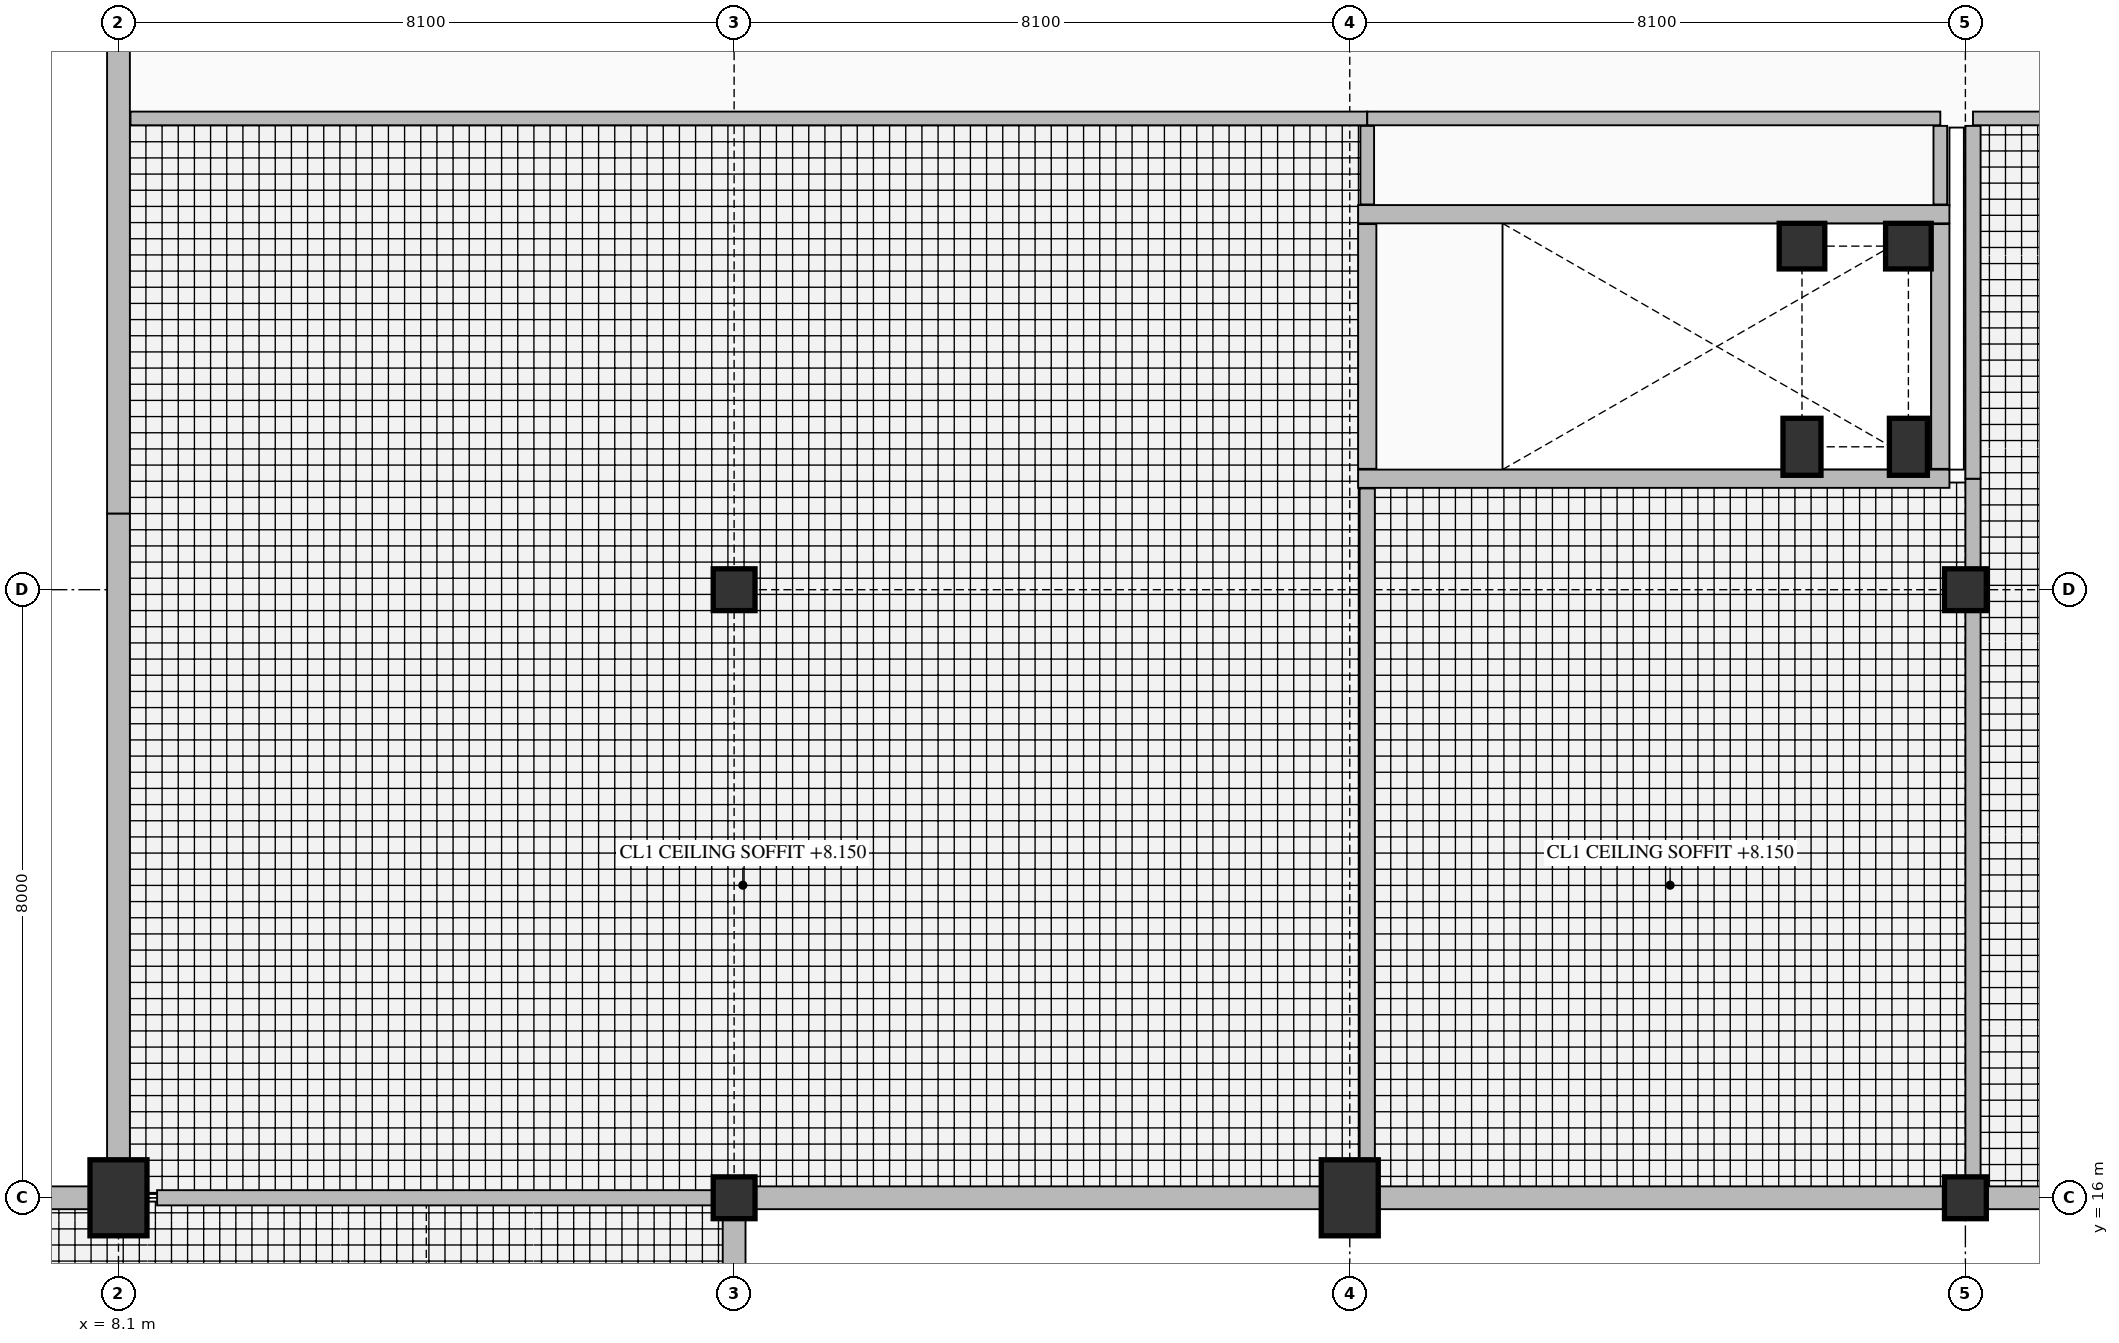
"""IFC4 building model, lengths in metres.
Left out: names, types, materials, properties, quantities, classifications, styles, units other than length and angle.
Written with IfcOpenShell. Run it as: python <this file> out.ifc"""

import sys

from ifc_helpers import new_model, si_unit, direction, frame, frame_2d, origin, origin_2d, place, context, subcontext, project, spatial, rectangle, extrude, element, fill, save


model = new_model("IFC4")
c1 = context("Model", 3, precision=1e-05, world=origin(), true_north=direction((0.0, 1.0)))
c2 = subcontext(c1, "Body", "Model", "MODEL_VIEW")
j1 = project(units=[si_unit("LENGTHUNIT", "METRE"), si_unit("PLANEANGLEUNIT", "RADIAN")], contexts=[c1])
p1 = place(None, origin())
s1 = spatial("IfcSite", under=j1, at=p1, CompositionType="ELEMENT")
p2 = place(p1, origin())
s2 = spatial("IfcBuilding", under=s1, at=p2, CompositionType="ELEMENT")
p3 = place(p2, frame((0.0, 0.0, 5.4)))
s3 = spatial("IfcBuildingStorey", under=s2, at=p3, CompositionType="ELEMENT", Elevation=5.4)
p4 = place(p3, frame((8.1, 16.0, 0.0), z_axis=(0.0, 0.0, 1.0), x_axis=(1.0, 0.0, 0.0)))
e1 = element("IfcColumn", 1, at=p4, inside=s3, PredefinedType="COLUMN", context=c2, shape_type="SweptSolid", body=[
    extrude(rectangle(XDim=0.75, YDim=1.0, at=origin_2d()), origin(), (0.0, 0.0, 1.0), 4.8),
])
for number, where, z_axis, x_axis in (
    (2, (16.2, 16.0, 0.0), (0.0, 0.0, 1.0), (1.0, 0.0, 0.0)),
    (3, (16.2, 24.0, 0.0), (0.0, 0.0, 1.0), (1.0, 0.0, 0.0)),
):
    element("IfcColumn", number, at=place(p3, frame(where, z_axis=z_axis, x_axis=x_axis)), inside=s3, PredefinedType="COLUMN", context=c2, shape_type="SweptSolid", body=[
        extrude(rectangle(XDim=0.55, YDim=0.55, at=origin_2d()), origin(), (0.0, 0.0, 1.0), 4.8),
    ])
p5 = place(p3, frame((24.3, 16.0, 0.0), z_axis=(0.0, 0.0, 1.0), x_axis=(1.0, 0.0, 0.0)))
e4 = element("IfcColumn", 4, at=p5, inside=s3, PredefinedType="COLUMN", context=c2, shape_type="SweptSolid", body=[
    extrude(rectangle(XDim=0.75, YDim=1.0, at=origin_2d()), origin(), (0.0, 0.0, 1.0), 4.8),
])
p6 = place(p3, frame((30.25, 25.88, 0.0), z_axis=(0.0, 0.0, 1.0), x_axis=(1.0, 0.0, 0.0)))
e5 = element("IfcColumn", 5, at=p6, inside=s3, PredefinedType="COLUMN", context=c2, shape_type="SweptSolid", body=[
    extrude(rectangle(XDim=0.5, YDim=0.75, at=origin_2d()), origin(), (0.0, 0.0, 1.0), 4.8),
])
p7 = place(p3, frame((30.25, 28.52, 0.0), z_axis=(0.0, 0.0, 1.0), x_axis=(1.0, 0.0, 0.0)))
e6 = element("IfcColumn", 6, at=p7, inside=s3, PredefinedType="COLUMN", context=c2, shape_type="SweptSolid", body=[
    extrude(rectangle(XDim=0.6, YDim=0.6, at=origin_2d()), origin(), (0.0, 0.0, 1.0), 4.8),
])
p8 = place(p3, frame((31.65, 25.88, 0.0), z_axis=(0.0, 0.0, 1.0), x_axis=(1.0, 0.0, 0.0)))
e7 = element("IfcColumn", 7, at=p8, inside=s3, PredefinedType="COLUMN", context=c2, shape_type="SweptSolid", body=[
    extrude(rectangle(XDim=0.5, YDim=0.75, at=origin_2d()), origin(), (0.0, 0.0, 1.0), 4.8),
])
p9 = place(p3, frame((31.65, 28.52, 0.0), z_axis=(0.0, 0.0, 1.0), x_axis=(1.0, 0.0, 0.0)))
e8 = element("IfcColumn", 8, at=p9, inside=s3, PredefinedType="COLUMN", context=c2, shape_type="SweptSolid", body=[
    extrude(rectangle(XDim=0.6, YDim=0.6, at=origin_2d()), origin(), (0.0, 0.0, 1.0), 4.8),
])
for number, where, z_axis, x_axis in (
    (9, (32.4, 16.0, 0.0), (0.0, 0.0, 1.0), (1.0, 0.0, 0.0)),
    (10, (32.4, 24.0, 0.0), (0.0, 0.0, 1.0), (1.0, 0.0, 0.0)),
):
    element("IfcColumn", number, at=place(p3, frame(where, z_axis=z_axis, x_axis=x_axis)), inside=s3, PredefinedType="COLUMN", context=c2, shape_type="SweptSolid", body=[
        extrude(rectangle(XDim=0.55, YDim=0.55, at=origin_2d()), origin(), (0.0, 0.0, 1.0), 4.8),
    ])
p10 = place(p3, frame((16.2, 0.0, 0.0), z_axis=(0.0, 0.0, 1.0), x_axis=(0.0, 1.0, 0.0)))
e11 = element("IfcWall", 11, at=p10, inside=s3, PredefinedType="SOLIDWALL", context=c2, shape_type="SweptSolid", body=[
    extrude(rectangle(XDim=16.0, YDim=0.3, at=frame_2d((8.0, 0.0))), origin(), (0.0, 0.0, 1.0), 3.912),
])
p11 = place(p3, frame((16.2, 16.0, 0.0), z_axis=(0.0, 0.0, 1.0), x_axis=(1.0, 0.0, 0.0)))
e12 = element("IfcWall", 12, at=p11, inside=s3, PredefinedType="SOLIDWALL", context=c2, shape_type="SweptSolid", body=[
    extrude(rectangle(XDim=16.2, YDim=0.3, at=frame_2d((8.1, 0.0))), origin(), (0.0, 0.0, 1.0), 3.812),
])
p12 = place(p3, frame((32.4, 16.0, 0.0), z_axis=(0.0, 0.0, 1.0), x_axis=(1.0, 0.0, 0.0)))
e13 = element("IfcWall", 13, at=p12, inside=s3, PredefinedType="SOLIDWALL", context=c2, shape_type="SweptSolid", body=[
    extrude(rectangle(XDim=16.2, YDim=0.3, at=frame_2d((8.1, 0.0))), origin(), (0.0, 0.0, 1.0), 3.812),
])
p13 = place(p3, frame((8.1, 34.0, 0.0), z_axis=(0.0, 0.0, 1.0), x_axis=(0.0, -1.0, 0.0)))
e14 = element("IfcWall", 14, at=p13, inside=s3, PredefinedType="SOLIDWALL", context=c2, shape_type="SweptSolid", body=[
    extrude(rectangle(XDim=9.0, YDim=0.3, at=frame_2d((4.5, 0.0))), origin(), (0.0, 0.0, 1.0), 3.312),
])
p14 = place(p13, frame((4.95, 0.0, 0.95)))
e15 = element("IfcOpeningElement", 15, at=p14, cuts=e14, PredefinedType="OPENING", context=c2, shape_type="SweptSolid", body=[
    extrude(rectangle(XDim=1.8, YDim=1.5, at=frame_2d((0.9, 0.75))), frame((0.0, 0.16, 0.0), z_axis=(0.0, -1.0, 0.0), x_axis=(1.0, 0.0, 0.0)), (0.0, 0.0, 1.0), 0.32),
])
p15 = place(p3, frame((8.1, 25.0, 0.0), z_axis=(0.0, 0.0, 1.0), x_axis=(0.0, -1.0, 0.0)))
e16 = element("IfcWall", 16, at=p15, inside=s3, PredefinedType="SOLIDWALL", context=c2, shape_type="SweptSolid", body=[
    extrude(rectangle(XDim=9.0, YDim=0.3, at=frame_2d((4.5, 0.0))), origin(), (0.0, 0.0, 1.0), 3.312),
])
p16 = place(p15, frame((3.6, 0.0, 0.95)))
e17 = element("IfcOpeningElement", 17, at=p16, cuts=e16, PredefinedType="OPENING", context=c2, shape_type="SweptSolid", body=[
    extrude(rectangle(XDim=1.8, YDim=1.8, at=frame_2d((0.9, 0.9))), frame((0.0, 0.16, 0.0), z_axis=(0.0, -1.0, 0.0), x_axis=(1.0, 0.0, 0.0)), (0.0, 0.0, 1.0), 0.32),
])
p17 = place(p3, frame((8.1, 16.0, 0.0), z_axis=(0.0, 0.0, 1.0), x_axis=(-1.0, 0.0, 0.0)))
e18 = element("IfcWall", 18, at=p17, inside=s3, PredefinedType="SOLIDWALL", context=c2, shape_type="SweptSolid", body=[
    extrude(rectangle(XDim=8.1, YDim=0.3, at=frame_2d((4.05, 0.0))), origin(), (0.0, 0.0, 1.0), 3.812),
])
p18 = place(p17, frame((3.15, 0.0, 0.85)))
e19 = element("IfcOpeningElement", 19, at=p18, cuts=e18, PredefinedType="OPENING", context=c2, shape_type="SweptSolid", body=[
    extrude(rectangle(XDim=1.8, YDim=2.1, at=frame_2d((0.9, 1.05))), frame((0.0, 0.16, 0.0), z_axis=(0.0, -1.0, 0.0), x_axis=(1.0, 0.0, 0.0)), (0.0, 0.0, 1.0), 0.32),
])
p19 = place(p3, frame((16.47, 12.48, 1.2), z_axis=(0.0, 0.0, 1.0), x_axis=(0.0, 1.0, 0.0)))
e20 = element("IfcWall", 20, at=p19, inside=s3, PredefinedType="PARAPET", context=c2, shape_type="SweptSolid", body=[
    extrude(rectangle(XDim=3.32, YDim=0.22, at=frame_2d((1.66, 0.0))), origin(), (0.0, 0.0, 1.0), 0.55),
])
p20 = place(p3, frame((24.41, 25.46, 0.0), z_axis=(0.0, 0.0, 1.0), x_axis=(1.0, 0.0, 0.0)))
e21 = element("IfcWall", 21, at=p20, inside=s3, PredefinedType="PARTITIONING", context=c2, shape_type="SweptSolid", body=[
    extrude(rectangle(XDim=7.78, YDim=0.24, at=frame_2d((3.89, 0.0))), origin(), (0.0, 0.0, 1.0), 4.52),
])
p21 = place(p3, frame((24.41, 28.94, 0.0), z_axis=(0.0, 0.0, 1.0), x_axis=(1.0, 0.0, 0.0)))
e22 = element("IfcWall", 22, at=p21, inside=s3, PredefinedType="PARTITIONING", context=c2, shape_type="SweptSolid", body=[
    extrude(rectangle(XDim=7.78, YDim=0.24, at=frame_2d((3.89, 0.0))), origin(), (0.0, 0.0, 1.0), 4.52),
])
p22 = place(p21, frame((0.54, 0.0, 0.0)))
e23 = element("IfcOpeningElement", 23, at=p22, cuts=e22, PredefinedType="OPENING", context=c2, shape_type="SweptSolid", body=[
    extrude(rectangle(XDim=1.1, YDim=2.2, at=frame_2d((0.55, 1.1))), frame((0.0, 0.13, 0.0), z_axis=(0.0, -1.0, 0.0), x_axis=(1.0, 0.0, 0.0)), (0.0, 0.0, 1.0), 0.26),
])
p23 = place(p3, frame((24.53, 25.59, 0.0), z_axis=(0.0, 0.0, 1.0), x_axis=(0.0, 1.0, 0.0)))
e24 = element("IfcWall", 24, at=p23, inside=s3, PredefinedType="PARTITIONING", context=c2, shape_type="SweptSolid", body=[
    extrude(rectangle(XDim=3.22, YDim=0.24, at=frame_2d((1.61, 0.0))), origin(), (0.0, 0.0, 1.0), 3.312),
])
p24 = place(p3, frame((32.07, 25.59, 0.0), z_axis=(0.0, 0.0, 1.0), x_axis=(0.0, 1.0, 0.0)))
e25 = element("IfcWall", 25, at=p24, inside=s3, PredefinedType="PARTITIONING", context=c2, shape_type="SweptSolid", body=[
    extrude(rectangle(XDim=3.22, YDim=0.24, at=frame_2d((1.61, 0.0))), origin(), (0.0, 0.0, 1.0), 3.912),
])
p25 = place(p3, frame((8.608, 16.0, 0.0), z_axis=(0.0, 0.0, 1.0), x_axis=(1.0, 0.0, 0.0)))
e26 = element("IfcWall", 26, at=p25, inside=s3, PredefinedType="PARTITIONING", context=c2, shape_type="SweptSolid", body=[
    extrude(rectangle(XDim=7.309, YDim=0.2, at=frame_2d((3.655, 0.0))), origin(), (0.0, 0.0, 1.0), 3.812),
])
p26 = place(p25, frame((3.155, 0.0, 0.0)))
e27 = element("IfcOpeningElement", 27, at=p26, cuts=e26, PredefinedType="OPENING", context=c2, shape_type="SweptSolid", body=[
    extrude(rectangle(XDim=1.0, YDim=2.2, at=frame_2d((0.5, 1.1))), frame((0.0, 0.11, 0.0), z_axis=(0.0, -1.0, 0.0), x_axis=(1.0, 0.0, 0.0)), (0.0, 0.0, 1.0), 0.22),
])
p27 = place(p3, frame((8.258, 30.2, 0.0), z_axis=(0.0, 0.0, 1.0), x_axis=(1.0, 0.0, 0.0)))
e28 = element("IfcWall", 28, at=p27, inside=s3, PredefinedType="PARTITIONING", context=c2, shape_type="SweptSolid", body=[
    extrude(rectangle(XDim=16.272, YDim=0.18, at=frame_2d((8.136, 0.0))), origin(), (0.0, 0.0, 1.0), 4.52),
])
p28 = place(p27, frame((4.782, 0.0, 0.0)))
e29 = element("IfcOpeningElement", 29, at=p28, cuts=e28, PredefinedType="OPENING", context=c2, shape_type="SweptSolid", body=[
    extrude(rectangle(XDim=1.5, YDim=2.3, at=frame_2d((0.75, 1.15))), frame((0.0, 0.1, 0.0), z_axis=(0.0, -1.0, 0.0), x_axis=(1.0, 0.0, 0.0)), (0.0, 0.0, 1.0), 0.2),
])
p29 = place(p3, frame((24.53, 30.2, 0.0), z_axis=(0.0, 0.0, 1.0), x_axis=(1.0, 0.0, 0.0)))
e30 = element("IfcWall", 30, at=p29, inside=s3, PredefinedType="PARTITIONING", context=c2, shape_type="SweptSolid", body=[
    extrude(rectangle(XDim=7.54, YDim=0.18, at=frame_2d((3.77, 0.0))), origin(), (0.0, 0.0, 1.0), 4.52),
])
p30 = place(p29, frame((3.22, 0.0, 0.0)))
e31 = element("IfcOpeningElement", 31, at=p30, cuts=e30, PredefinedType="OPENING", context=c2, shape_type="SweptSolid", body=[
    extrude(rectangle(XDim=1.1, YDim=2.2, at=frame_2d((0.55, 1.1))), frame((0.0, 0.1, 0.0), z_axis=(0.0, -1.0, 0.0), x_axis=(1.0, 0.0, 0.0)), (0.0, 0.0, 1.0), 0.2),
])
p31 = place(p3, frame((32.5, 30.2, 0.0), z_axis=(0.0, 0.0, 1.0), x_axis=(1.0, 0.0, 0.0)))
e32 = element("IfcWall", 32, at=p31, inside=s3, PredefinedType="PARTITIONING", context=c2, shape_type="SweptSolid", body=[
    extrude(rectangle(XDim=23.3, YDim=0.18, at=frame_2d((11.65, 0.0))), origin(), (0.0, 0.0, 1.0), 4.52),
])
p32 = place(p31, frame((10.85, 0.0, 0.0)))
e33 = element("IfcOpeningElement", 33, at=p32, cuts=e32, PredefinedType="OPENING", context=c2, shape_type="SweptSolid", body=[
    extrude(rectangle(XDim=1.6, YDim=2.35, at=frame_2d((0.8, 1.175))), frame((0.0, 0.1, 0.0), z_axis=(0.0, -1.0, 0.0), x_axis=(1.0, 0.0, 0.0)), (0.0, 0.0, 1.0), 0.2),
])
p33 = place(p3, frame((24.53, 16.508, 0.0), z_axis=(0.0, 0.0, 1.0), x_axis=(0.0, 1.0, 0.0)))
e34 = element("IfcWall", 34, at=p33, inside=s3, PredefinedType="PARTITIONING", context=c2, shape_type="SweptSolid", body=[
    extrude(rectangle(XDim=8.824, YDim=0.2, at=frame_2d((4.412, 0.0))), origin(), (0.0, 0.0, 1.0), 3.312),
])
p34 = place(p3, frame((24.53, 29.068, 0.0), z_axis=(0.0, 0.0, 1.0), x_axis=(0.0, 1.0, 0.0)))
e35 = element("IfcWall", 35, at=p34, inside=s3, PredefinedType="PARTITIONING", context=c2, shape_type="SweptSolid", body=[
    extrude(rectangle(XDim=1.034, YDim=0.18, at=frame_2d((0.517, 0.0))), origin(), (0.0, 0.0, 1.0), 3.312),
])
p35 = place(p3, frame((32.07, 29.068, 0.0), z_axis=(0.0, 0.0, 1.0), x_axis=(0.0, 1.0, 0.0)))
e36 = element("IfcWall", 36, at=p35, inside=s3, PredefinedType="PARTITIONING", context=c2, shape_type="SweptSolid", body=[
    extrude(rectangle(XDim=1.034, YDim=0.18, at=frame_2d((0.517, 0.0))), origin(), (0.0, 0.0, 1.0), 3.912),
])
p36 = place(p3, frame((32.5, 16.283, 0.0), z_axis=(0.0, 0.0, 1.0), x_axis=(0.0, 1.0, 0.0)))
e37 = element("IfcWall", 37, at=p36, inside=s3, PredefinedType="PARTITIONING", context=c2, shape_type="SweptSolid", body=[
    extrude(rectangle(XDim=7.434, YDim=0.2, at=frame_2d((3.717, 0.0))), origin(), (0.0, 0.0, 1.0), 4.095),
])
p37 = place(p36, frame((3.217, 0.0, 0.0)))
e38 = element("IfcOpeningElement", 38, at=p37, cuts=e37, PredefinedType="OPENING", context=c2, shape_type="SweptSolid", body=[
    extrude(rectangle(XDim=1.0, YDim=2.2, at=frame_2d((0.5, 1.1))), frame((0.0, 0.11, 0.0), z_axis=(0.0, -1.0, 0.0), x_axis=(1.0, 0.0, 0.0)), (0.0, 0.0, 1.0), 0.22),
])
p38 = place(p3, frame((32.5, 24.283, 0.0), z_axis=(0.0, 0.0, 1.0), x_axis=(0.0, 1.0, 0.0)))
e39 = element("IfcWall", 39, at=p38, inside=s3, PredefinedType="PARTITIONING", context=c2, shape_type="SweptSolid", body=[
    extrude(rectangle(XDim=1.177, YDim=0.2, at=frame_2d((0.588, 0.0))), origin(), (0.0, 0.0, 1.0), 3.912),
])
p39 = place(p3, frame((32.5, 25.46, 0.0), z_axis=(0.0, 0.0, 1.0), x_axis=(0.0, 1.0, 0.0)))
e40 = element("IfcWall", 40, at=p39, inside=s3, PredefinedType="PARTITIONING", context=c2, shape_type="SweptSolid", body=[
    extrude(rectangle(XDim=4.642, YDim=0.2, at=frame_2d((2.321, 0.0))), origin(), (0.0, 0.0, 1.0), 3.912),
])
p40 = place(p14, origin())
e41 = element("IfcWindow", 41, at=p40, inside=s3, PartitioningType="DOUBLE_PANEL_VERTICAL", PredefinedType="WINDOW", context=c2, shape_type="SweptSolid", body=[
    extrude(rectangle(XDim=1.8, YDim=1.5, at=frame_2d((0.9, 0.75))), frame((0.0, 0.03, 0.0), z_axis=(0.0, -1.0, 0.0), x_axis=(1.0, 0.0, 0.0)), (0.0, 0.0, 1.0), 0.06),
])
fill(e15, e41)
p41 = place(p16, origin())
e42 = element("IfcWindow", 42, at=p41, inside=s3, PartitioningType="DOUBLE_PANEL_VERTICAL", PredefinedType="WINDOW", context=c2, shape_type="SweptSolid", body=[
    extrude(rectangle(XDim=1.8, YDim=1.8, at=frame_2d((0.9, 0.9))), frame((0.0, 0.03, 0.0), z_axis=(0.0, -1.0, 0.0), x_axis=(1.0, 0.0, 0.0)), (0.0, 0.0, 1.0), 0.06),
])
fill(e17, e42)
p42 = place(p22, frame((1.1, 0.0, 0.0), z_axis=(0.0, 0.0, 1.0), x_axis=(-1.0, 0.0, 0.0)))
e43 = element("IfcDoor", 43, at=p42, inside=s3, OperationType="SINGLE_SWING_LEFT", PredefinedType="DOOR", context=c2, shape_type="SweptSolid", body=[
    extrude(rectangle(XDim=1.1, YDim=2.2, at=frame_2d((0.55, 1.1))), frame((0.0, 0.025, 0.0), z_axis=(0.0, -1.0, 0.0), x_axis=(1.0, 0.0, 0.0)), (0.0, 0.0, 1.0), 0.05),
])
fill(e23, e43)
p43 = place(p26, frame((1.0, 0.0, 0.0), z_axis=(0.0, 0.0, 1.0), x_axis=(-1.0, 0.0, 0.0)))
e44 = element("IfcDoor", 44, at=p43, inside=s3, OperationType="SINGLE_SWING_LEFT", PredefinedType="DOOR", context=c2, shape_type="SweptSolid", body=[
    extrude(rectangle(XDim=1.0, YDim=2.2, at=frame_2d((0.5, 1.1))), frame((0.0, 0.025, 0.0), z_axis=(0.0, -1.0, 0.0), x_axis=(1.0, 0.0, 0.0)), (0.0, 0.0, 1.0), 0.05),
])
fill(e27, e44)
p44 = place(p28, frame((1.5, 0.0, 0.0), z_axis=(0.0, 0.0, 1.0), x_axis=(-1.0, 0.0, 0.0)))
e45 = element("IfcDoor", 45, at=p44, inside=s3, OperationType="DOUBLE_DOOR_SINGLE_SWING", PredefinedType="DOOR", context=c2, shape_type="SweptSolid", body=[
    extrude(rectangle(XDim=1.5, YDim=2.3, at=frame_2d((0.75, 1.15))), frame((0.0, 0.025, 0.0), z_axis=(0.0, -1.0, 0.0), x_axis=(1.0, 0.0, 0.0)), (0.0, 0.0, 1.0), 0.05),
])
fill(e29, e45)
p45 = place(p30, origin())
e46 = element("IfcDoor", 46, at=p45, inside=s3, OperationType="SINGLE_SWING_RIGHT", PredefinedType="DOOR", context=c2, shape_type="SweptSolid", body=[
    extrude(rectangle(XDim=1.1, YDim=2.2, at=frame_2d((0.55, 1.1))), frame((0.0, 0.025, 0.0), z_axis=(0.0, -1.0, 0.0), x_axis=(1.0, 0.0, 0.0)), (0.0, 0.0, 1.0), 0.05),
])
fill(e31, e46)
p46 = place(p37, origin())
e47 = element("IfcDoor", 47, at=p46, inside=s3, OperationType="SINGLE_SWING_LEFT", PredefinedType="DOOR", context=c2, shape_type="SweptSolid", body=[
    extrude(rectangle(XDim=1.0, YDim=2.2, at=frame_2d((0.5, 1.1))), frame((0.0, 0.025, 0.0), z_axis=(0.0, -1.0, 0.0), x_axis=(1.0, 0.0, 0.0)), (0.0, 0.0, 1.0), 0.05),
])
fill(e38, e47)
save(model, sys.argv[1])
